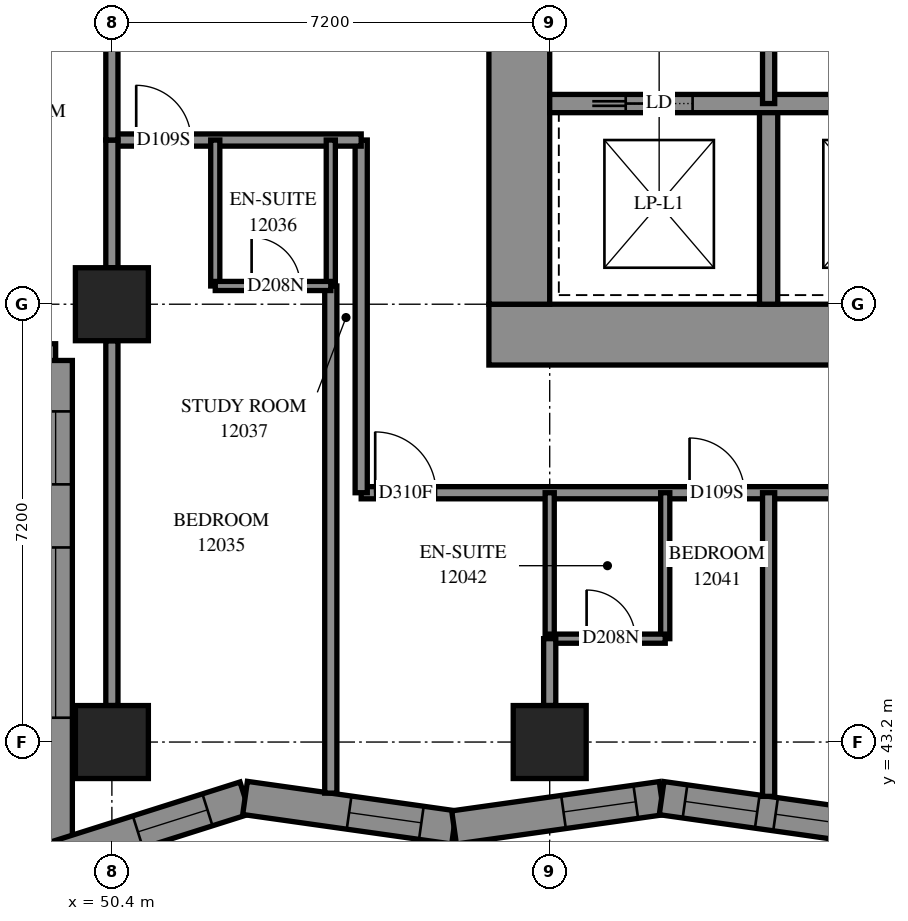
"""IFC4 building model, lengths in metres.
Left out: names, types, materials, properties, quantities, classifications, styles, units other than length and angle.
Written with IfcOpenShell. Run it as: python <this file> out.ifc"""

import sys

from ifc_helpers import new_model, si_unit, direction, frame, frame_2d, origin, origin_2d, place, context, subcontext, project, spatial, polyline, rectangle, outline, extrude, element, fill, save


model = new_model("IFC4")
c1 = context("Model", 3, precision=1e-05, world=origin(), true_north=direction((0.0, 1.0)))
c2 = subcontext(c1, "Body", "Model", "MODEL_VIEW")
j1 = project(units=[si_unit("LENGTHUNIT", "METRE"), si_unit("PLANEANGLEUNIT", "RADIAN")], contexts=[c1])
p1 = place(None, origin())
s1 = spatial("IfcSite", under=j1, at=p1, CompositionType="ELEMENT")
p2 = place(p1, origin())
s2 = spatial("IfcBuilding", under=s1, at=p2, CompositionType="ELEMENT")
p3 = place(p2, frame((0.0, 0.0, 47.4)))
s3 = spatial("IfcBuildingStorey", under=s2, at=p3, CompositionType="ELEMENT", Elevation=47.4)
for number, where, z_axis, x_axis in (
    (1, (50.4, 43.2, 0.0), (0.0, 0.0, 1.0), (1.0, 0.0, 0.0)),
    (2, (50.4, 50.4, 0.0), (0.0, 0.0, 1.0), (1.0, 0.0, 0.0)),
    (3, (57.6, 43.2, 0.0), (0.0, 0.0, 1.0), (1.0, 0.0, 0.0)),
):
    element("IfcColumn", number, at=place(p3, frame(where, z_axis=z_axis, x_axis=x_axis)), inside=s3, PredefinedType="COLUMN", context=c2, shape_type="SweptSolid", body=[
        extrude(rectangle(XDim=1.2, YDim=1.2, at=origin_2d()), origin(), (0.0, 0.0, 1.0), 3.1),
    ])
p4 = place(p3, frame((56.6, 49.9, -0.3), z_axis=(0.0, 0.0, 1.0), x_axis=(1.0, 0.0, 0.0)))
e4 = element("IfcWall", 4, at=p4, inside=s3, PredefinedType="SHEAR", context=c2, shape_type="SweptSolid", body=[
    extrude(rectangle(XDim=16.4, YDim=1.0, at=frame_2d((8.2, 0.0))), origin(), (0.0, 0.0, 1.0), 2.7),
])
p5 = place(p3, frame((57.1, 50.4, -0.3), z_axis=(0.0, 0.0, 1.0), x_axis=(0.0, 1.0, 0.0)))
e5 = element("IfcWall", 5, at=p5, inside=s3, PredefinedType="SHEAR", context=c2, shape_type="SweptSolid", body=[
    extrude(rectangle(XDim=14.4, YDim=1.0, at=frame_2d((7.2, 0.0))), origin(), (0.0, 0.0, 1.0), 2.7),
])
p6 = place(p5, frame((4.55, 0.0, 0.3)))
e6 = element("IfcOpeningElement", 6, at=p6, cuts=e5, PredefinedType="OPENING", context=c2, shape_type="SweptSolid", body=[
    extrude(rectangle(XDim=1.1, YDim=2.1, at=frame_2d((0.55, 1.05))), frame((0.0, 0.51, 0.0), z_axis=(0.0, -1.0, 0.0), x_axis=(1.0, 0.0, 0.0)), (0.0, 0.0, 1.0), 1.02),
])
p7 = place(p5, frame((11.35, 0.0, 0.3)))
e7 = element("IfcOpeningElement", 7, at=p7, cuts=e5, PredefinedType="OPENING", context=c2, shape_type="SweptSolid", body=[
    extrude(rectangle(XDim=1.1, YDim=2.1, at=frame_2d((0.55, 1.05))), frame((0.0, 0.51, 0.0), z_axis=(0.0, -1.0, 0.0), x_axis=(1.0, 0.0, 0.0)), (0.0, 0.0, 1.0), 1.02),
])
p8 = place(p3, frame((61.2, 50.4, 0.0), z_axis=(0.0, 0.0, 1.0), x_axis=(0.0, 1.0, 0.0)))
e8 = element("IfcWall", 8, at=p8, inside=s3, PredefinedType="SOLIDWALL", context=c2, shape_type="SweptSolid", body=[
    extrude(rectangle(XDim=3.3, YDim=0.3, at=frame_2d((1.65, 0.0))), origin(), (0.0, 0.0, 1.0), 3.1),
])
p9 = place(p3, frame((57.6, 53.7, 0.0), z_axis=(0.0, 0.0, 1.0), x_axis=(1.0, 0.0, 0.0)))
e9 = element("IfcWall", 9, at=p9, inside=s3, PredefinedType="SOLIDWALL", context=c2, shape_type="SweptSolid", body=[
    extrude(rectangle(XDim=14.4, YDim=0.3, at=frame_2d((7.2, 0.0))), origin(), (0.0, 0.0, 1.0), 3.1),
])
p10 = place(p9, frame((1.25, 0.0, 0.0)))
e10 = element("IfcOpeningElement", 10, at=p10, cuts=e9, PredefinedType="OPENING", context=c2, shape_type="SweptSolid", body=[
    extrude(rectangle(XDim=1.1, YDim=2.1, at=frame_2d((0.55, 1.05))), frame((0.0, 0.16, 0.0), z_axis=(0.0, -1.0, 0.0), x_axis=(1.0, 0.0, 0.0)), (0.0, 0.0, 1.0), 0.32),
])
p11 = place(p9, frame((4.85, 0.0, 0.0)))
e11 = element("IfcOpeningElement", 11, at=p11, cuts=e9, PredefinedType="OPENING", context=c2, shape_type="SweptSolid", body=[
    extrude(rectangle(XDim=1.1, YDim=2.1, at=frame_2d((0.55, 1.05))), frame((0.0, 0.16, 0.0), z_axis=(0.0, -1.0, 0.0), x_axis=(1.0, 0.0, 0.0)), (0.0, 0.0, 1.0), 0.32),
])
p12 = place(p9, frame((8.45, 0.0, 0.0)))
e12 = element("IfcOpeningElement", 12, at=p12, cuts=e9, PredefinedType="OPENING", context=c2, shape_type="SweptSolid", body=[
    extrude(rectangle(XDim=1.1, YDim=2.1, at=frame_2d((0.55, 1.05))), frame((0.0, 0.16, 0.0), z_axis=(0.0, -1.0, 0.0), x_axis=(1.0, 0.0, 0.0)), (0.0, 0.0, 1.0), 0.32),
])
p13 = place(p9, frame((12.05, 0.0, 0.0)))
e13 = element("IfcOpeningElement", 13, at=p13, cuts=e9, PredefinedType="OPENING", context=c2, shape_type="SweptSolid", body=[
    extrude(rectangle(XDim=1.1, YDim=2.1, at=frame_2d((0.55, 1.05))), frame((0.0, 0.16, 0.0), z_axis=(0.0, -1.0, 0.0), x_axis=(1.0, 0.0, 0.0)), (0.0, 0.0, 1.0), 0.32),
])
p14 = place(p3, frame((42.275, 49.475, 0.0), z_axis=(0.0, 0.0, 1.0), x_axis=(1.0, 0.0, 0.0)))
e14 = element("IfcWall", 14, at=p14, inside=s3, PredefinedType="SOLIDWALL", context=c2, shape_type="SweptSolid", body=[
    extrude(outline(polyline([(-0.275, -0.275), (6.925, -0.275), (7.475, 0.275), (0.275, 0.275), (-0.275, -0.275)])), origin(), (0.0, 0.0, 1.0), 3.1),
])
p15 = place(p14, frame((1.325, 0.0, 0.5)))
e15 = element("IfcOpeningElement", 15, at=p15, cuts=e14, PredefinedType="OPENING", context=c2, shape_type="SweptSolid", body=[
    extrude(rectangle(XDim=2.8, YDim=2.45, at=frame_2d((1.4, 1.225))), frame((0.0, 0.285, 0.0), z_axis=(0.0, -1.0, 0.0), x_axis=(1.0, 0.0, 0.0)), (0.0, 0.0, 1.0), 0.57),
])
p16 = place(p14, frame((5.162, 0.0, 0.5)))
e16 = element("IfcOpeningElement", 16, at=p16, cuts=e14, PredefinedType="OPENING", context=c2, shape_type="SweptSolid", body=[
    extrude(rectangle(XDim=1.2, YDim=2.45, at=frame_2d((0.6, 1.225))), frame((0.0, 0.285, 0.0), z_axis=(0.0, -1.0, 0.0), x_axis=(1.0, 0.0, 0.0)), (0.0, 0.0, 1.0), 0.57),
])
p17 = place(p3, frame((49.475, 49.475, 0.0), z_axis=(0.0, 0.0, 1.0), x_axis=(0.0, -1.0, 0.0)))
e17 = element("IfcWall", 17, at=p17, inside=s3, PredefinedType="SOLIDWALL", context=c2, shape_type="SweptSolid", body=[
    extrude(outline(polyline([(0.275, -0.275), (8.557, -0.275), (7.806, 0.275), (-0.275, 0.275), (0.275, -0.275)])), origin(), (0.0, 0.0, 1.0), 3.1),
])
p18 = place(p17, frame((3.075, 0.0, 0.5)))
e18 = element("IfcOpeningElement", 18, at=p18, cuts=e17, PredefinedType="OPENING", context=c2, shape_type="SweptSolid", body=[
    extrude(rectangle(XDim=2.8, YDim=2.45, at=frame_2d((1.4, 1.225))), frame((0.0, 0.285, 0.0), z_axis=(0.0, -1.0, 0.0), x_axis=(1.0, 0.0, 0.0)), (0.0, 0.0, 1.0), 0.57),
])
p19 = place(p17, frame((0.838, 0.0, 0.5)))
e19 = element("IfcOpeningElement", 19, at=p19, cuts=e17, PredefinedType="OPENING", context=c2, shape_type="SweptSolid", body=[
    extrude(rectangle(XDim=1.2, YDim=2.45, at=frame_2d((0.6, 1.225))), frame((0.0, 0.285, 0.0), z_axis=(0.0, -1.0, 0.0), x_axis=(1.0, 0.0, 0.0)), (0.0, 0.0, 1.0), 0.57),
])
p20 = place(p3, frame((49.475, 41.294, 0.0), z_axis=(0.0, 0.0, 1.0), x_axis=(0.9532643936, 0.3021373791, 0.0)))
e20 = element("IfcWall", 20, at=p20, inside=s3, PredefinedType="SOLIDWALL", context=c2, shape_type="SweptSolid", body=[
    extrude(outline(polyline([(-0.376, -0.275), (3.205, -0.275), (3.33, 0.275), (0.376, 0.275), (-0.376, -0.275)])), origin(), (0.0, 0.0, 1.0), 3.1),
])
p21 = place(p20, frame((1.419, 0.0, 0.5)))
e21 = element("IfcOpeningElement", 21, at=p21, cuts=e20, PredefinedType="OPENING", context=c2, shape_type="SweptSolid", body=[
    extrude(rectangle(XDim=1.2, YDim=2.45, at=frame_2d((0.6, 1.225))), frame((0.0, 0.285, 0.0), z_axis=(0.0, -1.0, 0.0), x_axis=(1.0, 0.0, 0.0)), (0.0, 0.0, 1.0), 0.57),
])
p22 = place(p3, frame((52.59, 42.281, 0.0), z_axis=(0.0, 0.0, 1.0), x_axis=(0.9901775212, -0.1398158663, 0.0)))
e22 = element("IfcWall", 22, at=p22, inside=s3, PredefinedType="SOLIDWALL", context=c2, shape_type="SweptSolid", body=[
    extrude(outline(polyline([(0.062, -0.275), (3.51, -0.275), (3.432, 0.275), (-0.062, 0.275), (0.062, -0.275)])), origin(), (0.0, 0.0, 1.0), 3.1),
])
p23 = place(p22, frame((1.728, 0.0, 0.5)))
e23 = element("IfcOpeningElement", 23, at=p23, cuts=e22, PredefinedType="OPENING", context=c2, shape_type="SweptSolid", body=[
    extrude(rectangle(XDim=1.2, YDim=2.45, at=frame_2d((0.6, 1.225))), frame((0.0, 0.285, 0.0), z_axis=(0.0, -1.0, 0.0), x_axis=(1.0, 0.0, 0.0)), (0.0, 0.0, 1.0), 0.57),
])
p24 = place(p3, frame((56.027, 41.796, 0.0), z_axis=(0.0, 0.0, 1.0), x_axis=(0.9901773547, 0.1398170455, 0.0)))
e24 = element("IfcWall", 24, at=p24, inside=s3, PredefinedType="SOLIDWALL", context=c2, shape_type="SweptSolid", body=[
    extrude(outline(polyline([(-0.039, -0.275), (3.409, -0.275), (3.486, 0.275), (0.039, 0.275), (-0.039, -0.275)])), origin(), (0.0, 0.0, 1.0), 3.1),
])
p25 = place(p24, frame((1.818, 0.0, 0.5)))
e25 = element("IfcOpeningElement", 25, at=p25, cuts=e24, PredefinedType="OPENING", context=c2, shape_type="SweptSolid", body=[
    extrude(rectangle(XDim=1.2, YDim=2.45, at=frame_2d((0.6, 1.225))), frame((0.0, 0.285, 0.0), z_axis=(0.0, -1.0, 0.0), x_axis=(1.0, 0.0, 0.0)), (0.0, 0.0, 1.0), 0.57),
])
p26 = place(p3, frame((59.44, 42.278, 0.0), z_axis=(0.0, 0.0, 1.0), x_axis=(0.9901773547, -0.1398170455, 0.0)))
e26 = element("IfcWall", 26, at=p26, inside=s3, PredefinedType="SOLIDWALL", context=c2, shape_type="SweptSolid", body=[
    extrude(outline(polyline([(0.039, -0.275), (3.486, -0.275), (3.409, 0.275), (-0.039, 0.275), (0.039, -0.275)])), origin(), (0.0, 0.0, 1.0), 3.1),
])
p27 = place(p26, frame((0.389, 0.0, 0.5)))
e27 = element("IfcOpeningElement", 27, at=p27, cuts=e26, PredefinedType="OPENING", context=c2, shape_type="SweptSolid", body=[
    extrude(rectangle(XDim=1.2, YDim=2.45, at=frame_2d((0.6, 1.225))), frame((0.0, 0.285, 0.0), z_axis=(0.0, -1.0, 0.0), x_axis=(1.0, 0.0, 0.0)), (0.0, 0.0, 1.0), 0.57),
])
p28 = place(p26, frame((1.893, 0.0, 0.5)))
e28 = element("IfcOpeningElement", 28, at=p28, cuts=e26, PredefinedType="OPENING", context=c2, shape_type="SweptSolid", body=[
    extrude(rectangle(XDim=1.2, YDim=2.45, at=frame_2d((0.6, 1.225))), frame((0.0, 0.285, 0.0), z_axis=(0.0, -1.0, 0.0), x_axis=(1.0, 0.0, 0.0)), (0.0, 0.0, 1.0), 0.57),
])
p29 = place(p3, frame((61.2, 53.7, 0.0), z_axis=(0.0, 0.0, 1.0), x_axis=(0.0, 1.0, 0.0)))
e29 = element("IfcWall", 29, at=p29, inside=s3, PredefinedType="PARTITIONING", context=c2, shape_type="SweptSolid", body=[
    extrude(rectangle(XDim=3.6, YDim=0.2, at=frame_2d((1.8, 0.0))), origin(), (0.0, 0.0, 1.0), 3.1),
])
p30 = place(p3, frame((54.5, 47.3, 0.0), z_axis=(0.0, 0.0, 1.0), x_axis=(1.0, 0.0, 0.0)))
e30 = element("IfcWall", 30, at=p30, inside=s3, PredefinedType="PARTITIONING", context=c2, shape_type="SweptSolid", body=[
    extrude(rectangle(XDim=19.56, YDim=0.2, at=frame_2d((9.78, 0.0))), origin(), (0.0, 0.0, 1.0), 3.1),
])
p31 = place(p30, frame((0.23, 0.0, 0.0)))
e31 = element("IfcOpeningElement", 31, at=p31, cuts=e30, PredefinedType="OPENING", context=c2, shape_type="SweptSolid", body=[
    extrude(rectangle(XDim=1.0, YDim=2.1, at=frame_2d((0.5, 1.05))), frame((0.0, 0.11, 0.0), z_axis=(0.0, -1.0, 0.0), x_axis=(1.0, 0.0, 0.0)), (0.0, 0.0, 1.0), 0.22),
])
p32 = place(p30, frame((5.4, 0.0, 0.0)))
e32 = element("IfcOpeningElement", 32, at=p32, cuts=e30, PredefinedType="OPENING", context=c2, shape_type="SweptSolid", body=[
    extrude(rectangle(XDim=0.9, YDim=2.1, at=frame_2d((0.45, 1.05))), frame((0.0, 0.11, 0.0), z_axis=(0.0, -1.0, 0.0), x_axis=(1.0, 0.0, 0.0)), (0.0, 0.0, 1.0), 0.22),
])
p33 = place(p30, frame((9.001, 0.0, 0.0)))
e33 = element("IfcOpeningElement", 33, at=p33, cuts=e30, PredefinedType="OPENING", context=c2, shape_type="SweptSolid", body=[
    extrude(rectangle(XDim=0.9, YDim=2.1, at=frame_2d((0.45, 1.05))), frame((0.0, 0.11, 0.0), z_axis=(0.0, -1.0, 0.0), x_axis=(1.0, 0.0, 0.0)), (0.0, 0.0, 1.0), 0.22),
])
p34 = place(p30, frame((14.3, 0.0, 0.0)))
e34 = element("IfcOpeningElement", 34, at=p34, cuts=e30, PredefinedType="OPENING", context=c2, shape_type="SweptSolid", body=[
    extrude(rectangle(XDim=0.9, YDim=2.1, at=frame_2d((0.45, 1.05))), frame((0.0, 0.11, 0.0), z_axis=(0.0, -1.0, 0.0), x_axis=(1.0, 0.0, 0.0)), (0.0, 0.0, 1.0), 0.22),
])
p35 = place(p3, frame((54.0, 42.36, 0.0), z_axis=(0.0, 0.0, 1.0), x_axis=(0.0, 1.0, 0.0)))
e35 = element("IfcWall", 35, at=p35, inside=s3, PredefinedType="PARTITIONING", context=c2, shape_type="SweptSolid", body=[
    extrude(rectangle(XDim=8.34, YDim=0.2, at=frame_2d((4.17, 0.0))), origin(), (0.0, 0.0, 1.0), 3.1),
])
p36 = place(p3, frame((50.4, 43.8, 0.0), z_axis=(0.0, 0.0, 1.0), x_axis=(0.0, 1.0, 0.0)))
e36 = element("IfcWall", 36, at=p36, inside=s3, PredefinedType="PARTITIONING", context=c2, shape_type="SweptSolid", body=[
    extrude(rectangle(XDim=6.0, YDim=0.2, at=frame_2d((3.0, 0.0))), origin(), (0.0, 0.0, 1.0), 2.6),
])
p37 = place(p3, frame((54.5, 47.3, 0.0), z_axis=(0.0, 0.0, 1.0), x_axis=(0.0, 1.0, 0.0)))
e37 = element("IfcWall", 37, at=p37, inside=s3, PredefinedType="PARTITIONING", context=c2, shape_type="SweptSolid", body=[
    extrude(rectangle(XDim=5.8, YDim=0.2, at=frame_2d((2.9, 0.0))), origin(), (0.0, 0.0, 1.0), 3.1),
])
p38 = place(p3, frame((61.2, 42.307, 0.0), z_axis=(0.0, 0.0, 1.0), x_axis=(0.0, 1.0, 0.0)))
e38 = element("IfcWall", 38, at=p38, inside=s3, PredefinedType="PARTITIONING", context=c2, shape_type="SweptSolid", body=[
    extrude(rectangle(XDim=4.993, YDim=0.2, at=frame_2d((2.497, 0.0))), origin(), (0.0, 0.0, 1.0), 3.1),
])
p39 = place(p3, frame((50.4, 53.1, 0.0), z_axis=(0.0, 0.0, 1.0), x_axis=(1.0, 0.0, 0.0)))
e39 = element("IfcWall", 39, at=p39, inside=s3, PredefinedType="PARTITIONING", context=c2, shape_type="SweptSolid", body=[
    extrude(rectangle(XDim=4.1, YDim=0.2, at=frame_2d((2.05, 0.0))), origin(), (0.0, 0.0, 1.0), 3.1),
])
p40 = place(p39, frame((0.4, 0.0, 0.0)))
e40 = element("IfcOpeningElement", 40, at=p40, cuts=e39, PredefinedType="OPENING", context=c2, shape_type="SweptSolid", body=[
    extrude(rectangle(XDim=0.9, YDim=2.1, at=frame_2d((0.45, 1.05))), frame((0.0, 0.11, 0.0), z_axis=(0.0, -1.0, 0.0), x_axis=(1.0, 0.0, 0.0)), (0.0, 0.0, 1.0), 0.22),
])
for number, where, z_axis, x_axis in (
    (41, (52.1, 50.7, 0.0), (0.0, 0.0, 1.0), (0.0, 1.0, 0.0)),
    (42, (54.0, 50.7, 0.0), (0.0, 0.0, 1.0), (0.0, 1.0, 0.0)),
    (43, (59.5, 44.9, 0.0), (0.0, 0.0, 1.0), (0.0, 1.0, 0.0)),
    (44, (57.6, 44.9, 0.0), (0.0, 0.0, 1.0), (0.0, 1.0, 0.0)),
):
    element("IfcWall", number, at=place(p3, frame(where, z_axis=z_axis, x_axis=x_axis)), inside=s3, PredefinedType="PARTITIONING", context=c2, shape_type="SweptSolid", body=[
        extrude(rectangle(XDim=2.4, YDim=0.15, at=frame_2d((1.2, 0.0))), origin(), (0.0, 0.0, 1.0), 3.1),
    ])
p41 = place(p3, frame((50.4, 51.0, 0.0), z_axis=(0.0, 0.0, 1.0), x_axis=(0.0, 1.0, 0.0)))
e45 = element("IfcWall", 45, at=p41, inside=s3, PredefinedType="PARTITIONING", context=c2, shape_type="SweptSolid", body=[
    extrude(rectangle(XDim=2.1, YDim=0.2, at=frame_2d((1.05, 0.0))), origin(), (0.0, 0.0, 1.0), 3.1),
])
p42 = place(p3, frame((52.1, 50.7, 0.0), z_axis=(0.0, 0.0, 1.0), x_axis=(1.0, 0.0, 0.0)))
e46 = element("IfcWall", 46, at=p42, inside=s3, PredefinedType="PARTITIONING", context=c2, shape_type="SweptSolid", body=[
    extrude(rectangle(XDim=1.9, YDim=0.15, at=frame_2d((0.95, 0.0))), origin(), (0.0, 0.0, 1.0), 3.1),
])
p43 = place(p42, frame((0.598, 0.0, 0.0)))
e47 = element("IfcOpeningElement", 47, at=p43, cuts=e46, PredefinedType="OPENING", context=c2, shape_type="SweptSolid", body=[
    extrude(rectangle(XDim=0.8, YDim=2.1, at=frame_2d((0.4, 1.05))), frame((0.0, 0.085, 0.0), z_axis=(0.0, -1.0, 0.0), x_axis=(1.0, 0.0, 0.0)), (0.0, 0.0, 1.0), 0.17),
])
p44 = place(p3, frame((57.6, 44.9, 0.0), z_axis=(0.0, 0.0, 1.0), x_axis=(1.0, 0.0, 0.0)))
e48 = element("IfcWall", 48, at=p44, inside=s3, PredefinedType="PARTITIONING", context=c2, shape_type="SweptSolid", body=[
    extrude(rectangle(XDim=1.9, YDim=0.15, at=frame_2d((0.95, 0.0))), origin(), (0.0, 0.0, 1.0), 3.1),
])
p45 = place(p44, frame((0.607, 0.0, 0.0)))
e49 = element("IfcOpeningElement", 49, at=p45, cuts=e48, PredefinedType="OPENING", context=c2, shape_type="SweptSolid", body=[
    extrude(rectangle(XDim=0.8, YDim=2.1, at=frame_2d((0.4, 1.05))), frame((0.0, 0.085, 0.0), z_axis=(0.0, -1.0, 0.0), x_axis=(1.0, 0.0, 0.0)), (0.0, 0.0, 1.0), 0.17),
])
p46 = place(p3, frame((50.4, 53.1, 0.0), z_axis=(0.0, 0.0, 1.0), x_axis=(0.0, 1.0, 0.0)))
e50 = element("IfcWall", 50, at=p46, inside=s3, PredefinedType="PARTITIONING", context=c2, shape_type="SweptSolid", body=[
    extrude(rectangle(XDim=1.8, YDim=0.2, at=frame_2d((0.9, 0.0))), origin(), (0.0, 0.0, 1.0), 3.1),
])
p47 = place(p3, frame((57.6, 43.8, 0.0), z_axis=(0.0, 0.0, 1.0), x_axis=(0.0, 1.0, 0.0)))
e51 = element("IfcWall", 51, at=p47, inside=s3, PredefinedType="PARTITIONING", context=c2, shape_type="SweptSolid", body=[
    extrude(rectangle(XDim=1.1, YDim=0.2, at=frame_2d((0.55, 0.0))), origin(), (0.0, 0.0, 1.0), 3.1),
])
p48 = place(p18, origin())
e52 = element("IfcWindow", 52, at=p48, inside=s3, PartitioningType="SINGLE_PANEL", PredefinedType="WINDOW", context=c2, shape_type="SweptSolid", body=[
    extrude(rectangle(XDim=2.8, YDim=2.45, at=frame_2d((1.4, 1.225))), frame((0.0, 0.155, 0.0), z_axis=(0.0, -1.0, 0.0), x_axis=(1.0, 0.0, 0.0)), (0.0, 0.0, 1.0), 0.06),
])
fill(e18, e52)
p49 = place(p19, origin())
e53 = element("IfcWindow", 53, at=p49, inside=s3, PartitioningType="SINGLE_PANEL", PredefinedType="WINDOW", context=c2, shape_type="SweptSolid", body=[
    extrude(rectangle(XDim=1.2, YDim=2.45, at=frame_2d((0.6, 1.225))), frame((0.0, 0.155, 0.0), z_axis=(0.0, -1.0, 0.0), x_axis=(1.0, 0.0, 0.0)), (0.0, 0.0, 1.0), 0.06),
])
fill(e19, e53)
p50 = place(p21, origin())
e54 = element("IfcWindow", 54, at=p50, inside=s3, PartitioningType="SINGLE_PANEL", PredefinedType="WINDOW", context=c2, shape_type="SweptSolid", body=[
    extrude(rectangle(XDim=1.2, YDim=2.45, at=frame_2d((0.6, 1.225))), frame((0.0, 0.155, 0.0), z_axis=(0.0, -1.0, 0.0), x_axis=(1.0, 0.0, 0.0)), (0.0, 0.0, 1.0), 0.06),
])
fill(e21, e54)
p51 = place(p23, origin())
e55 = element("IfcWindow", 55, at=p51, inside=s3, PartitioningType="SINGLE_PANEL", PredefinedType="WINDOW", context=c2, shape_type="SweptSolid", body=[
    extrude(rectangle(XDim=1.2, YDim=2.45, at=frame_2d((0.6, 1.225))), frame((0.0, 0.155, 0.0), z_axis=(0.0, -1.0, 0.0), x_axis=(1.0, 0.0, 0.0)), (0.0, 0.0, 1.0), 0.06),
])
fill(e23, e55)
p52 = place(p25, origin())
e56 = element("IfcWindow", 56, at=p52, inside=s3, PartitioningType="SINGLE_PANEL", PredefinedType="WINDOW", context=c2, shape_type="SweptSolid", body=[
    extrude(rectangle(XDim=1.2, YDim=2.45, at=frame_2d((0.6, 1.225))), frame((0.0, 0.155, 0.0), z_axis=(0.0, -1.0, 0.0), x_axis=(1.0, 0.0, 0.0)), (0.0, 0.0, 1.0), 0.06),
])
fill(e25, e56)
p53 = place(p27, origin())
e57 = element("IfcWindow", 57, at=p53, inside=s3, PartitioningType="SINGLE_PANEL", PredefinedType="WINDOW", context=c2, shape_type="SweptSolid", body=[
    extrude(rectangle(XDim=1.2, YDim=2.45, at=frame_2d((0.6, 1.225))), frame((0.0, 0.155, 0.0), z_axis=(0.0, -1.0, 0.0), x_axis=(1.0, 0.0, 0.0)), (0.0, 0.0, 1.0), 0.06),
])
fill(e27, e57)
p54 = place(p28, origin())
e58 = element("IfcWindow", 58, at=p54, inside=s3, PartitioningType="SINGLE_PANEL", PredefinedType="WINDOW", context=c2, shape_type="SweptSolid", body=[
    extrude(rectangle(XDim=1.2, YDim=2.45, at=frame_2d((0.6, 1.225))), frame((0.0, 0.155, 0.0), z_axis=(0.0, -1.0, 0.0), x_axis=(1.0, 0.0, 0.0)), (0.0, 0.0, 1.0), 0.06),
])
fill(e28, e58)
p55 = place(p10, origin())
e59 = element("IfcDoor", 59, at=p55, inside=s3, OperationType="SLIDING_TO_LEFT", PredefinedType="DOOR", context=c2, shape_type="SweptSolid", body=[
    extrude(rectangle(XDim=1.1, YDim=2.1, at=frame_2d((0.55, 1.05))), frame((0.0, 0.025, 0.0), z_axis=(0.0, -1.0, 0.0), x_axis=(1.0, 0.0, 0.0)), (0.0, 0.0, 1.0), 0.05),
])
fill(e10, e59)
p56 = place(p40, origin())
e60 = element("IfcDoor", 60, at=p56, inside=s3, OperationType="SINGLE_SWING_LEFT", PredefinedType="DOOR", context=c2, shape_type="SweptSolid", body=[
    extrude(rectangle(XDim=0.9, YDim=2.1, at=frame_2d((0.45, 1.05))), frame((0.0, 0.025, 0.0), z_axis=(0.0, -1.0, 0.0), x_axis=(1.0, 0.0, 0.0)), (0.0, 0.0, 1.0), 0.05),
])
fill(e40, e60)
p57 = place(p43, origin())
e61 = element("IfcDoor", 61, at=p57, inside=s3, OperationType="SINGLE_SWING_RIGHT", PredefinedType="DOOR", context=c2, shape_type="SweptSolid", body=[
    extrude(rectangle(XDim=0.8, YDim=2.1, at=frame_2d((0.4, 1.05))), frame((0.0, 0.025, 0.0), z_axis=(0.0, -1.0, 0.0), x_axis=(1.0, 0.0, 0.0)), (0.0, 0.0, 1.0), 0.05),
])
fill(e47, e61)
p58 = place(p31, origin())
e62 = element("IfcDoor", 62, at=p58, inside=s3, OperationType="SINGLE_SWING_RIGHT", PredefinedType="DOOR", context=c2, shape_type="SweptSolid", body=[
    extrude(rectangle(XDim=1.0, YDim=2.1, at=frame_2d((0.5, 1.05))), frame((0.0, 0.025, 0.0), z_axis=(0.0, -1.0, 0.0), x_axis=(1.0, 0.0, 0.0)), (0.0, 0.0, 1.0), 0.05),
])
fill(e31, e62)
p59 = place(p32, origin())
e63 = element("IfcDoor", 63, at=p59, inside=s3, OperationType="SINGLE_SWING_LEFT", PredefinedType="DOOR", context=c2, shape_type="SweptSolid", body=[
    extrude(rectangle(XDim=0.9, YDim=2.1, at=frame_2d((0.45, 1.05))), frame((0.0, 0.025, 0.0), z_axis=(0.0, -1.0, 0.0), x_axis=(1.0, 0.0, 0.0)), (0.0, 0.0, 1.0), 0.05),
])
fill(e32, e63)
p60 = place(p45, origin())
e64 = element("IfcDoor", 64, at=p60, inside=s3, OperationType="SINGLE_SWING_RIGHT", PredefinedType="DOOR", context=c2, shape_type="SweptSolid", body=[
    extrude(rectangle(XDim=0.8, YDim=2.1, at=frame_2d((0.4, 1.05))), frame((0.0, 0.025, 0.0), z_axis=(0.0, -1.0, 0.0), x_axis=(1.0, 0.0, 0.0)), (0.0, 0.0, 1.0), 0.05),
])
fill(e49, e64)
save(model, sys.argv[1])
